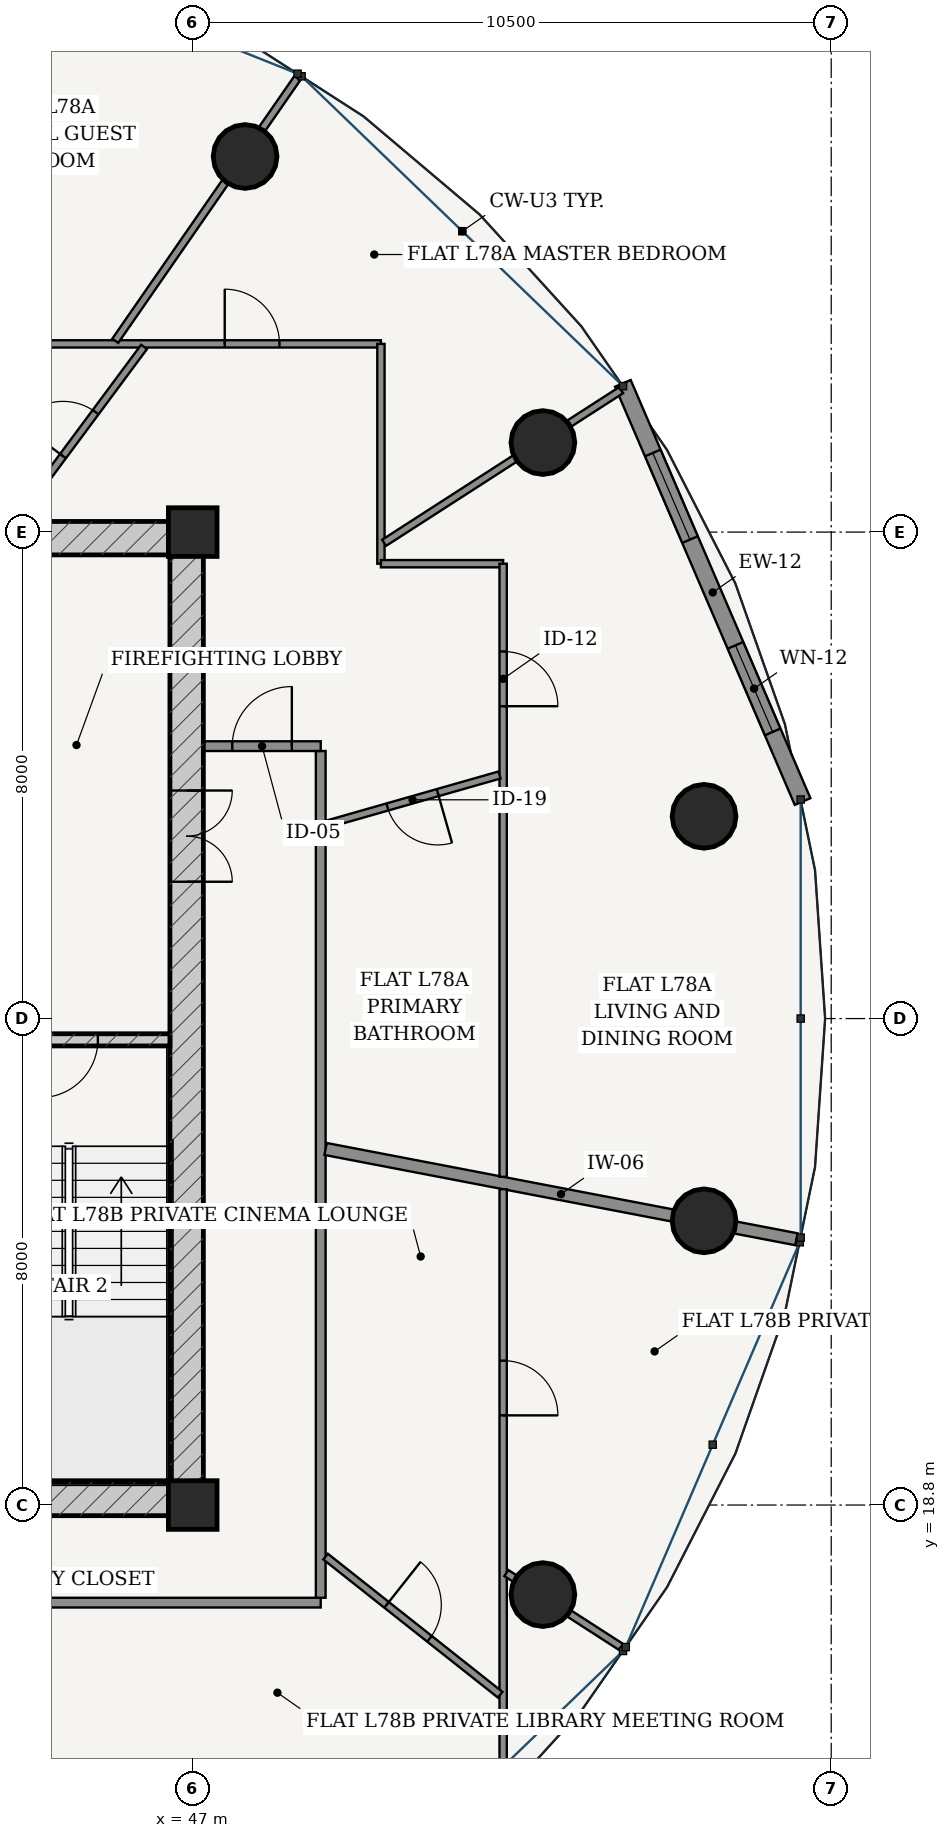
"""IFC4 building model, lengths in metres.
Left out: names, types, materials, properties, quantities, classifications, styles, units other than length and angle.
Written with IfcOpenShell. Run it as: python <this file> out.ifc"""

import sys

from ifc_helpers import new_model, si_unit, direction, frame, frame_2d, origin, origin_2d, place, context, subcontext, project, spatial, rectangle, hollow_circle, extrude, source, transform, mapped, element, fill, save


model = new_model("IFC4")
c1 = context("Model", 3, precision=1e-05, world=origin(), true_north=direction((-0.2419218956, 0.970295726276)))
c2 = subcontext(c1, "Body", "Model", "MODEL_VIEW")
j1 = project(units=[si_unit("LENGTHUNIT", "METRE"), si_unit("PLANEANGLEUNIT", "RADIAN")], contexts=[c1])
p1 = place(None, origin())
s1 = spatial("IfcSite", under=j1, at=p1, CompositionType="ELEMENT")
p2 = place(p1, origin())
s2 = spatial("IfcBuilding", under=s1, at=p2, CompositionType="ELEMENT")
p3 = place(p2, frame((0.0, 0.0, 296.95)))
s3 = spatial("IfcBuildingStorey", under=s2, at=p3, CompositionType="ELEMENT", Elevation=296.95)
for number, where, z_axis, x_axis in (
    (1, (47.0, 18.8, 0.0), (0.0, 0.0, 1.0), (1.0, 0.0, 0.0)),
    (2, (47.0, 34.8, 0.0), (0.0, 0.0, 1.0), (1.0, 0.0, 0.0)),
):
    element("IfcColumn", number, at=place(p3, frame(where, z_axis=z_axis, x_axis=x_axis)), inside=s3, PredefinedType="COLUMN", context=c2, shape_type="SweptSolid", body=[
        extrude(rectangle(XDim=0.8, YDim=0.8, at=origin_2d()), origin(), (0.0, 0.0, 1.0), 3.75),
    ])
p4 = place(p3, frame((28.825, 18.9, 0.0), z_axis=(0.0, 0.0, 1.0), x_axis=(1.0, 0.0, 0.0)))
e3 = element("IfcWall", 3, at=p4, inside=s3, PredefinedType="SHEAR", context=c2, shape_type="SweptSolid", body=[
    extrude(rectangle(XDim=18.35, YDim=0.55, at=frame_2d((9.175, 0.0))), origin(), (0.0, 0.0, 1.0), 3.3),
])
p5 = place(p4, frame((8.75, 0.0, 0.0)))
e4 = element("IfcOpeningElement", 4, at=p5, cuts=e3, PredefinedType="OPENING", context=c2, shape_type="SweptSolid", body=[
    extrude(rectangle(XDim=0.85, YDim=2.1, at=frame_2d((0.425, 1.05))), frame((0.0, 0.285, 0.0), z_axis=(0.0, -1.0, 0.0), x_axis=(1.0, 0.0, 0.0)), (0.0, 0.0, 1.0), 0.57),
])
p6 = place(p3, frame((28.825, 34.7, 0.0), z_axis=(0.0, 0.0, 1.0), x_axis=(1.0, 0.0, 0.0)))
e5 = element("IfcWall", 5, at=p6, inside=s3, PredefinedType="SHEAR", context=c2, shape_type="SweptSolid", body=[
    extrude(rectangle(XDim=18.35, YDim=0.55, at=frame_2d((9.175, 0.0))), origin(), (0.0, 0.0, 1.0), 3.3),
])
p7 = place(p3, frame((46.9, 19.175, 0.0), z_axis=(0.0, 0.0, 1.0), x_axis=(0.0, 1.0, 0.0)))
e6 = element("IfcWall", 6, at=p7, inside=s3, PredefinedType="SHEAR", context=c2, shape_type="SweptSolid", body=[
    extrude(rectangle(XDim=15.25, YDim=0.55, at=frame_2d((7.625, 0.0))), origin(), (0.0, 0.0, 1.0), 3.3),
])
p8 = place(p7, frame((9.875, 0.0, 0.0)))
e7 = element("IfcOpeningElement", 7, at=p8, cuts=e6, PredefinedType="OPENING", context=c2, shape_type="SweptSolid", body=[
    extrude(rectangle(XDim=1.5, YDim=2.2, at=frame_2d((0.75, 1.1))), frame((0.0, 0.285, 0.0), z_axis=(0.0, -1.0, 0.0), x_axis=(1.0, 0.0, 0.0)), (0.0, 0.0, 1.0), 0.57),
])
p9 = place(p3, frame((43.305, 26.45, 0.0), z_axis=(0.0, 0.0, 1.0), x_axis=(1.0, 0.0, 0.0)))
e8 = element("IfcWall", 8, at=p9, inside=s3, PredefinedType="SOLIDWALL", context=c2, shape_type="SweptSolid", body=[
    extrude(rectangle(XDim=3.32, YDim=0.2, at=frame_2d((1.66, 0.0))), origin(), (0.0, 0.0, 1.0), 3.3),
])
p10 = place(p9, frame((1.185, 0.0, 0.0)))
e9 = element("IfcOpeningElement", 9, at=p10, cuts=e8, PredefinedType="OPENING", context=c2, shape_type="SweptSolid", body=[
    extrude(rectangle(XDim=0.95, YDim=2.15, at=frame_2d((0.475, 1.075))), frame((0.0, 0.11, 0.0), z_axis=(0.0, -1.0, 0.0), x_axis=(1.0, 0.0, 0.0)), (0.0, 0.0, 1.0), 0.22),
])
for number, where, z_axis, x_axis in (
    (10, (55.409, 30.126, 0.0), (0.0, 0.0, 1.0), (1.0, 0.0, 0.0)),
    (11, (52.759, 36.272, 0.0), (0.0, 0.0, 1.0), (1.0, 0.0, 0.0)),
    (12, (47.861, 40.977, 0.0), (0.0, 0.0, 1.0), (1.0, 0.0, 0.0)),
    (13, (52.759, 17.328, 0.0), (0.0, 0.0, 1.0), (1.0, 0.0, 0.0)),
    (14, (55.409, 23.474, 0.0), (0.0, 0.0, 1.0), (1.0, 0.0, 0.0)),
):
    element("IfcColumn", number, at=place(p3, frame(where, z_axis=z_axis, x_axis=x_axis)), inside=s3, PredefinedType="COLUMN", context=c2, shape_type="SweptSolid", body=[
        extrude(hollow_circle(Radius=0.525, WallThickness=0.035, at=origin_2d()), origin(), (0.0, 0.0, 1.0), 3.75),
    ])
p11 = place(p3, frame((57.029, 30.369, 0.0), z_axis=(0.0, 0.0, 1.0), x_axis=(-0.394816612978, 0.918759948037, 0.0)))
e15 = element("IfcWall", 15, at=p11, inside=s3, PredefinedType="SOLIDWALL", context=c2, shape_type="SweptSolid", body=[
    extrude(rectangle(XDim=7.485, YDim=0.28, at=frame_2d((3.743, 0.0))), origin(), (0.0, 0.0, 1.0), 3.3),
])
p12 = place(p11, frame((1.246, 0.0, 0.85)))
e16 = element("IfcOpeningElement", 16, at=p12, cuts=e15, PredefinedType="OPENING", context=c2, shape_type="SweptSolid", body=[
    extrude(rectangle(XDim=1.55, YDim=1.95, at=frame_2d((0.775, 0.975))), frame((0.0, 0.15, 0.0), z_axis=(0.0, -1.0, 0.0), x_axis=(1.0, 0.0, 0.0)), (0.0, 0.0, 1.0), 0.3),
])
p13 = place(p11, frame((4.689, 0.0, 0.85)))
e17 = element("IfcOpeningElement", 17, at=p13, cuts=e15, PredefinedType="OPENING", context=c2, shape_type="SweptSolid", body=[
    extrude(rectangle(XDim=1.55, YDim=1.95, at=frame_2d((0.775, 0.975))), frame((0.0, 0.15, 0.0), z_axis=(0.0, -1.0, 0.0), x_axis=(1.0, 0.0, 0.0)), (0.0, 0.0, 1.0), 0.3),
])
p14 = place(p3, frame((26.895, 17.195, 0.0), z_axis=(0.0, 0.0, 1.0), x_axis=(1.0, 0.0, 0.0)))
e18 = element("IfcWall", 18, at=p14, inside=s3, PredefinedType="PARTITIONING", context=c2, shape_type="SweptSolid", body=[
    extrude(rectangle(XDim=22.21, YDim=0.16, at=frame_2d((11.105, 0.0))), origin(), (0.0, 0.0, 1.0), 2.825),
])
p15 = place(p14, frame((2.902, 0.0, 0.0)))
e19 = element("IfcOpeningElement", 19, at=p15, cuts=e18, PredefinedType="OPENING", context=c2, shape_type="SweptSolid", body=[
    extrude(rectangle(XDim=0.98, YDim=2.2, at=frame_2d((0.49, 1.1))), frame((0.0, 0.09, 0.0), z_axis=(0.0, -1.0, 0.0), x_axis=(1.0, 0.0, 0.0)), (0.0, 0.0, 1.0), 0.18),
])
p16 = place(p3, frame((49.105, 17.275, 0.0), z_axis=(0.0, 0.0, 1.0), x_axis=(0.0, 1.0, 0.0)))
e20 = element("IfcWall", 20, at=p16, inside=s3, PredefinedType="PARTITIONING", context=c2, shape_type="SweptSolid", body=[
    extrude(rectangle(XDim=13.925, YDim=0.16, at=frame_2d((6.962, 0.0))), origin(), (0.0, 0.0, 1.0), 2.825),
])
p17 = place(p3, frame((47.175, 31.28, 0.0), z_axis=(0.0, 0.0, 1.0), x_axis=(1.0, 0.0, 0.0)))
e21 = element("IfcWall", 21, at=p17, inside=s3, PredefinedType="PARTITIONING", context=c2, shape_type="SweptSolid", body=[
    extrude(rectangle(XDim=1.93, YDim=0.16, at=frame_2d((0.965, 0.0))), origin(), (0.0, 0.0, 1.0), 3.3),
])
p18 = place(p17, frame((0.475, 0.0, 0.0)))
e22 = element("IfcOpeningElement", 22, at=p18, cuts=e21, PredefinedType="OPENING", context=c2, shape_type="SweptSolid", body=[
    extrude(rectangle(XDim=0.98, YDim=2.2, at=frame_2d((0.49, 1.1))), frame((0.0, 0.09, 0.0), z_axis=(0.0, -1.0, 0.0), x_axis=(1.0, 0.0, 0.0)), (0.0, 0.0, 1.0), 0.18),
])
p19 = place(p3, frame((49.185, 24.656, 0.0), z_axis=(0.0, 0.0, 1.0), x_axis=(0.982109889803, -0.188308694305, 0.0)))
e23 = element("IfcWall", 23, at=p19, inside=s3, PredefinedType="PARTITIONING", context=c2, shape_type="SweptSolid", body=[
    extrude(rectangle(XDim=7.884, YDim=0.2, at=frame_2d((3.942, 0.0))), origin(), (0.0, 0.0, 1.0), 2.65),
])
p20 = place(p3, frame((25.905, 37.895, 0.0), z_axis=(0.0, 0.0, 1.0), x_axis=(1.0, 0.0, 0.0)))
e24 = element("IfcWall", 24, at=p20, inside=s3, PredefinedType="PARTITIONING", context=c2, shape_type="SweptSolid", body=[
    extrude(rectangle(XDim=24.19, YDim=0.12, at=frame_2d((12.095, 0.0))), origin(), (0.0, 0.0, 1.0), 2.825),
])
p21 = place(p20, frame((21.621, 0.0, 0.0)))
e25 = element("IfcOpeningElement", 25, at=p21, cuts=e24, PredefinedType="OPENING", context=c2, shape_type="SweptSolid", body=[
    extrude(rectangle(XDim=0.9, YDim=2.15, at=frame_2d((0.45, 1.075))), frame((0.0, 0.07, 0.0), z_axis=(0.0, -1.0, 0.0), x_axis=(1.0, 0.0, 0.0)), (0.0, 0.0, 1.0), 0.14),
])
p22 = place(p20, frame((16.661, 0.0, 0.0)))
e26 = element("IfcOpeningElement", 26, at=p22, cuts=e24, PredefinedType="OPENING", context=c2, shape_type="SweptSolid", body=[
    extrude(rectangle(XDim=0.9, YDim=2.15, at=frame_2d((0.45, 1.075))), frame((0.0, 0.07, 0.0), z_axis=(0.0, -1.0, 0.0), x_axis=(1.0, 0.0, 0.0)), (0.0, 0.0, 1.0), 0.14),
])
p23 = place(p20, frame((1.872, 0.0, 0.0)))
e27 = element("IfcOpeningElement", 27, at=p23, cuts=e24, PredefinedType="OPENING", context=c2, shape_type="SweptSolid", body=[
    extrude(rectangle(XDim=0.9, YDim=2.15, at=frame_2d((0.45, 1.075))), frame((0.0, 0.07, 0.0), z_axis=(0.0, -1.0, 0.0), x_axis=(1.0, 0.0, 0.0)), (0.0, 0.0, 1.0), 0.14),
])
p24 = place(p3, frame((50.095, 37.895, 0.0), z_axis=(0.0, 0.0, 1.0), x_axis=(0.0, -1.0, 0.0)))
e28 = element("IfcWall", 28, at=p24, inside=s3, PredefinedType="PARTITIONING", context=c2, shape_type="SweptSolid", body=[
    extrude(rectangle(XDim=3.615, YDim=0.12, at=frame_2d((1.808, 0.0))), origin(), (0.0, 0.0, 1.0), 2.825),
])
p25 = place(p3, frame((50.095, 34.28, 0.0), z_axis=(0.0, 0.0, 1.0), x_axis=(1.0, 0.0, 0.0)))
e29 = element("IfcWall", 29, at=p25, inside=s3, PredefinedType="PARTITIONING", context=c2, shape_type="SweptSolid", body=[
    extrude(rectangle(XDim=2.01, YDim=0.12, at=frame_2d((1.005, 0.0))), origin(), (0.0, 0.0, 1.0), 3.3),
])
p26 = place(p3, frame((52.105, 34.28, 0.0), z_axis=(0.0, 0.0, 1.0), x_axis=(0.0, -1.0, 0.0)))
e30 = element("IfcWall", 30, at=p26, inside=s3, PredefinedType="PARTITIONING", context=c2, shape_type="SweptSolid", body=[
    extrude(rectangle(XDim=10.083, YDim=0.12, at=frame_2d((5.041, 0.0))), origin(), (0.0, 0.0, 1.0), 2.825),
])
p27 = place(p26, frame((1.444, 0.0, 0.0)))
e31 = element("IfcOpeningElement", 31, at=p27, cuts=e30, PredefinedType="OPENING", context=c2, shape_type="SweptSolid", body=[
    extrude(rectangle(XDim=0.9, YDim=2.15, at=frame_2d((0.45, 1.075))), frame((0.0, 0.07, 0.0), z_axis=(0.0, -1.0, 0.0), x_axis=(1.0, 0.0, 0.0)), (0.0, 0.0, 1.0), 0.14),
])
p28 = place(p3, frame((50.147, 34.624, 0.0), z_axis=(0.0, 0.0, 1.0), x_axis=(0.840694066929, 0.541510374628, 0.0)))
e32 = element("IfcWall", 32, at=p28, inside=s3, PredefinedType="PARTITIONING", context=c2, shape_type="SweptSolid", body=[
    extrude(rectangle(XDim=4.637, YDim=0.12, at=frame_2d((2.319, 0.0))), origin(), (0.0, 0.0, 1.0), 2.65),
])
p29 = place(p3, frame((45.726, 37.946, 0.0), z_axis=(0.0, 0.0, 1.0), x_axis=(0.569678410446, 0.821867695357, 0.0)))
e33 = element("IfcWall", 33, at=p29, inside=s3, PredefinedType="PARTITIONING", context=c2, shape_type="SweptSolid", body=[
    extrude(rectangle(XDim=5.257, YDim=0.12, at=frame_2d((2.628, 0.0))), origin(), (0.0, 0.0, 1.0), 2.65),
])
p30 = place(p3, frame((49.185, 29.99, 0.0), z_axis=(0.0, 0.0, 1.0), x_axis=(0.961663207035, 0.274233251511, 0.0)))
e34 = element("IfcWall", 34, at=p30, inside=s3, PredefinedType="PARTITIONING", context=c2, shape_type="SweptSolid", body=[
    extrude(rectangle(XDim=2.974, YDim=0.12, at=frame_2d((1.487, 0.0))), origin(), (0.0, 0.0, 1.0), 3.019),
])
p31 = place(p30, frame((1.057, 0.0, 0.0)))
e35 = element("IfcOpeningElement", 35, at=p31, cuts=e34, PredefinedType="OPENING", context=c2, shape_type="SweptSolid", body=[
    extrude(rectangle(XDim=0.86, YDim=2.15, at=frame_2d((0.43, 1.075))), frame((0.0, 0.07, 0.0), z_axis=(0.0, -1.0, 0.0), x_axis=(1.0, 0.0, 0.0)), (0.0, 0.0, 1.0), 0.14),
])
p32 = place(p3, frame((44.07, 34.977, 0.0), z_axis=(0.0, 0.0, 1.0), x_axis=(0.596034582173, 0.802958764106, 0.0)))
e36 = element("IfcWall", 36, at=p32, inside=s3, PredefinedType="PARTITIONING", context=c2, shape_type="SweptSolid", body=[
    extrude(rectangle(XDim=3.573, YDim=0.12, at=frame_2d((1.786, 0.0))), origin(), (0.0, 0.0, 1.0), 3.019),
])
p33 = place(p32, frame((1.336, 0.0, 0.0)))
e37 = element("IfcOpeningElement", 37, at=p33, cuts=e36, PredefinedType="OPENING", context=c2, shape_type="SweptSolid", body=[
    extrude(rectangle(XDim=0.9, YDim=2.15, at=frame_2d((0.45, 1.075))), frame((0.0, 0.07, 0.0), z_axis=(0.0, -1.0, 0.0), x_axis=(1.0, 0.0, 0.0)), (0.0, 0.0, 1.0), 0.14),
])
p34 = place(p3, frame((52.105, 23.994, 0.0), z_axis=(0.0, 0.0, 1.0), x_axis=(0.0, -1.0, 0.0)))
e38 = element("IfcWall", 38, at=p34, inside=s3, PredefinedType="PARTITIONING", context=c2, shape_type="SweptSolid", body=[
    extrude(rectangle(XDim=9.605, YDim=0.12, at=frame_2d((4.803, 0.0))), origin(), (0.0, 0.0, 1.0), 2.65),
])
p35 = place(p34, frame((2.819, 0.0, 0.0)))
e39 = element("IfcOpeningElement", 39, at=p35, cuts=e38, PredefinedType="OPENING", context=c2, shape_type="SweptSolid", body=[
    extrude(rectangle(XDim=0.9, YDim=2.15, at=frame_2d((0.45, 1.075))), frame((0.0, 0.07, 0.0), z_axis=(0.0, -1.0, 0.0), x_axis=(1.0, 0.0, 0.0)), (0.0, 0.0, 1.0), 0.14),
])
p36 = place(p3, frame((52.157, 17.682, 0.0), z_axis=(0.0, 0.0, 1.0), x_axis=(0.840690872836, -0.541515333421, 0.0)))
e40 = element("IfcWall", 40, at=p36, inside=s3, PredefinedType="PARTITIONING", context=c2, shape_type="SweptSolid", body=[
    extrude(rectangle(XDim=2.247, YDim=0.12, at=frame_2d((1.123, 0.0))), origin(), (0.0, 0.0, 1.0), 2.65),
])
p37 = place(p3, frame((49.185, 17.952, 0.0), z_axis=(0.0, 0.0, 1.0), x_axis=(0.784266179732, -0.620424499297, 0.0)))
e41 = element("IfcWall", 41, at=p37, inside=s3, PredefinedType="PARTITIONING", context=c2, shape_type="SweptSolid", body=[
    extrude(rectangle(XDim=3.661, YDim=0.12, at=frame_2d((1.831, 0.0))), origin(), (0.0, 0.0, 1.0), 2.931),
])
p38 = place(p37, frame((1.279, 0.0, 0.0)))
e42 = element("IfcOpeningElement", 42, at=p38, cuts=e41, PredefinedType="OPENING", context=c2, shape_type="SweptSolid", body=[
    extrude(rectangle(XDim=0.9, YDim=2.15, at=frame_2d((0.45, 1.075))), frame((0.0, 0.07, 0.0), z_axis=(0.0, -1.0, 0.0), x_axis=(1.0, 0.0, 0.0)), (0.0, 0.0, 1.0), 0.14),
])
m1 = source(origin(), c2, "Body", "SweptSolid", [
    extrude(rectangle(XDim=1.55, YDim=1.95, at=frame_2d((0.775, 0.975))), frame((0.0, 0.03, 0.0), z_axis=(0.0, -1.0, 0.0), x_axis=(1.0, 0.0, 0.0)), (0.0, 0.0, 1.0), 0.06),
])
p39 = place(p12, origin())
e43 = element("IfcWindow", 43, at=p39, inside=s3, PartitioningType="SINGLE_PANEL", PredefinedType="WINDOW", context=c2, shape_type="MappedRepresentation", body=[
    mapped(m1, transform((0.0, 0.0, 0.0), scale=1.0)),
])
fill(e16, e43)
p40 = place(p13, origin())
e44 = element("IfcWindow", 44, at=p40, inside=s3, PartitioningType="SINGLE_PANEL", PredefinedType="WINDOW", context=c2, shape_type="MappedRepresentation", body=[
    mapped(m1, transform((0.0, 0.0, 0.0), scale=1.0)),
])
fill(e17, e44)
m2 = source(origin(), c2, "Body", "SweptSolid", [
    extrude(rectangle(XDim=1.5, YDim=2.2, at=frame_2d((0.75, 1.1))), frame((0.0, 0.025, 0.0), z_axis=(0.0, -1.0, 0.0), x_axis=(1.0, 0.0, 0.0)), (0.0, 0.0, 1.0), 0.05),
])
p41 = place(p8, frame((1.5, 0.0, 0.0), z_axis=(0.0, 0.0, 1.0), x_axis=(-1.0, 0.0, 0.0)))
e45 = element("IfcDoor", 45, at=p41, inside=s3, OperationType="DOUBLE_DOOR_SINGLE_SWING", PredefinedType="DOOR", context=c2, shape_type="MappedRepresentation", body=[
    mapped(m2, transform((0.0, 0.0, 0.0), scale=1.0)),
])
fill(e7, e45)
m3 = source(origin(), c2, "Body", "SweptSolid", [
    extrude(rectangle(XDim=0.95, YDim=2.15, at=frame_2d((0.475, 1.075))), frame((0.0, 0.025, 0.0), z_axis=(0.0, -1.0, 0.0), x_axis=(1.0, 0.0, 0.0)), (0.0, 0.0, 1.0), 0.05),
])
p42 = place(p10, frame((0.95, 0.0, 0.0), z_axis=(0.0, 0.0, 1.0), x_axis=(-1.0, 0.0, 0.0)))
e46 = element("IfcDoor", 46, at=p42, inside=s3, OperationType="SINGLE_SWING_RIGHT", PredefinedType="DOOR", context=c2, shape_type="MappedRepresentation", body=[
    mapped(m3, transform((0.0, 0.0, 0.0), scale=1.0)),
])
fill(e9, e46)
m4 = source(origin(), c2, "Body", "SweptSolid", [
    extrude(rectangle(XDim=0.98, YDim=2.2, at=frame_2d((0.49, 1.1))), frame((0.0, 0.025, 0.0), z_axis=(0.0, -1.0, 0.0), x_axis=(1.0, 0.0, 0.0)), (0.0, 0.0, 1.0), 0.05),
])
p43 = place(p18, origin())
e47 = element("IfcDoor", 47, at=p43, inside=s3, OperationType="SINGLE_SWING_RIGHT", PredefinedType="DOOR", context=c2, shape_type="MappedRepresentation", body=[
    mapped(m4, transform((0.0, 0.0, 0.0), scale=1.0)),
])
fill(e22, e47)
m5 = source(origin(), c2, "Body", "SweptSolid", [
    extrude(rectangle(XDim=0.86, YDim=2.15, at=frame_2d((0.43, 1.075))), frame((0.0, 0.025, 0.0), z_axis=(0.0, -1.0, 0.0), x_axis=(1.0, 0.0, 0.0)), (0.0, 0.0, 1.0), 0.05),
])
p44 = place(p31, frame((0.86, 0.0, 0.0), z_axis=(0.0, 0.0, 1.0), x_axis=(-1.0, 0.0, 0.0)))
e48 = element("IfcDoor", 48, at=p44, inside=s3, OperationType="SINGLE_SWING_LEFT", PredefinedType="DOOR", context=c2, shape_type="MappedRepresentation", body=[
    mapped(m5, transform((0.0, 0.0, 0.0), scale=1.0)),
])
fill(e35, e48)
m6 = source(origin(), c2, "Body", "SweptSolid", [
    extrude(rectangle(XDim=0.9, YDim=2.15, at=frame_2d((0.45, 1.075))), frame((0.0, 0.025, 0.0), z_axis=(0.0, -1.0, 0.0), x_axis=(1.0, 0.0, 0.0)), (0.0, 0.0, 1.0), 0.05),
])
p45 = place(p27, origin())
e49 = element("IfcDoor", 49, at=p45, inside=s3, OperationType="SINGLE_SWING_RIGHT", PredefinedType="DOOR", context=c2, shape_type="MappedRepresentation", body=[
    mapped(m6, transform((0.0, 0.0, 0.0), scale=1.0)),
])
fill(e31, e49)
p46 = place(p33, origin())
e50 = element("IfcDoor", 50, at=p46, inside=s3, OperationType="SINGLE_SWING_LEFT", PredefinedType="DOOR", context=c2, shape_type="MappedRepresentation", body=[
    mapped(m6, transform((0.0, 0.0, 0.0), scale=1.0)),
])
fill(e37, e50)
p47 = place(p21, origin())
e51 = element("IfcDoor", 51, at=p47, inside=s3, OperationType="SINGLE_SWING_LEFT", PredefinedType="DOOR", context=c2, shape_type="MappedRepresentation", body=[
    mapped(m6, transform((0.0, 0.0, 0.0), scale=1.0)),
])
fill(e25, e51)
p48 = place(p38, origin())
e52 = element("IfcDoor", 52, at=p48, inside=s3, OperationType="SINGLE_SWING_LEFT", PredefinedType="DOOR", context=c2, shape_type="MappedRepresentation", body=[
    mapped(m6, transform((0.0, 0.0, 0.0), scale=1.0)),
])
fill(e42, e52)
p49 = place(p35, origin())
e53 = element("IfcDoor", 53, at=p49, inside=s3, OperationType="SINGLE_SWING_RIGHT", PredefinedType="DOOR", context=c2, shape_type="MappedRepresentation", body=[
    mapped(m6, transform((0.0, 0.0, 0.0), scale=1.0)),
])
fill(e39, e53)
save(model, sys.argv[1])
